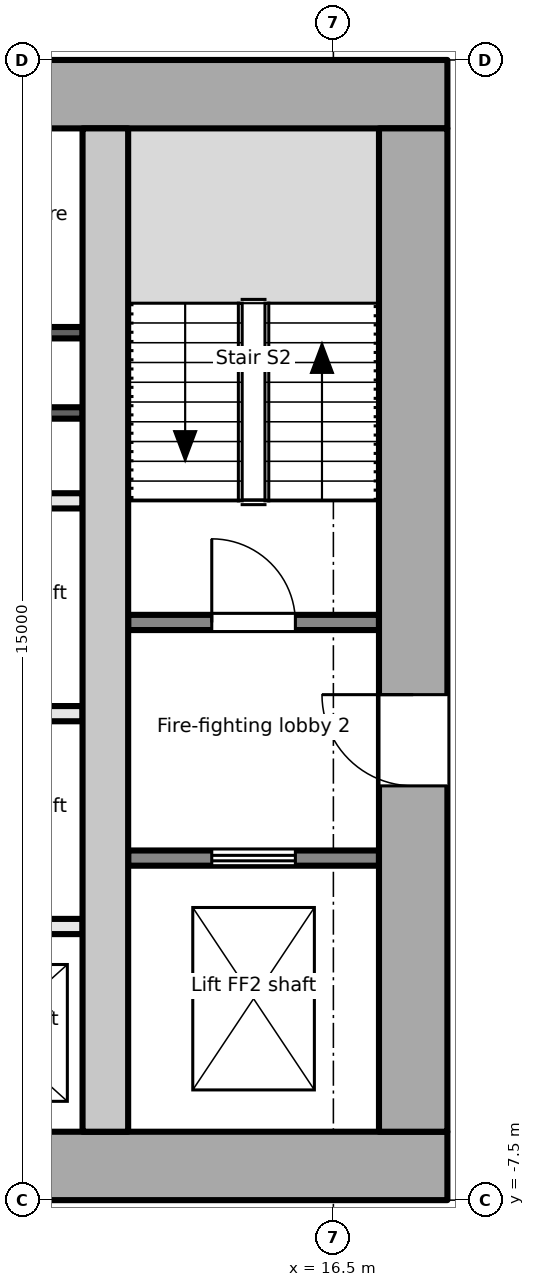
"""IFC4 building model, lengths in metres.
Left out: names, types, materials, properties, quantities, classifications, styles, units other than length and angle.
Written with IfcOpenShell. Run it as: python <this file> out.ifc"""

import sys

from ifc_helpers import new_model, si_unit, direction, frame, frame_2d, origin, place, context, subcontext, project, spatial, rectangle, extrude, element, fill, save


model = new_model("IFC4")
c1 = context("Model", 3, precision=1e-05, world=origin(), true_north=direction((0.0, 1.0)))
c2 = subcontext(c1, "Body", "Model", "MODEL_VIEW")
j1 = project(units=[si_unit("LENGTHUNIT", "METRE"), si_unit("PLANEANGLEUNIT", "RADIAN")], contexts=[c1])
p1 = place(None, origin())
s1 = spatial("IfcSite", under=j1, at=p1, CompositionType="ELEMENT")
p2 = place(p1, origin())
s2 = spatial("IfcBuilding", under=s1, at=p2, CompositionType="ELEMENT")
p3 = place(p2, frame((0.0, 0.0, 83.7)))
s3 = spatial("IfcBuildingStorey", under=s2, at=p3, CompositionType="ELEMENT", Elevation=83.7)
p4 = place(p3, frame((-18.0, -7.05, -0.2), z_axis=(0.0, 0.0, 1.0), x_axis=(1.0, 0.0, 0.0)))
e1 = element("IfcWall", 1, at=p4, inside=s3, PredefinedType="SHEAR", context=c2, shape_type="SweptSolid", body=[
    extrude(rectangle(XDim=36.0, YDim=0.9, at=frame_2d((18.0, 0.0))), origin(), (0.0, 0.0, 1.0), 4.0),
])
p5 = place(p4, frame((7.8, 0.0, 0.2)))
e2 = element("IfcOpeningElement", 2, at=p5, cuts=e1, PredefinedType="OPENING", context=c2, shape_type="SweptSolid", body=[
    extrude(rectangle(XDim=2.4, YDim=2.1, at=frame_2d((1.2, 1.05))), frame((0.0, 0.46, 0.0), z_axis=(0.0, -1.0, 0.0), x_axis=(1.0, 0.0, 0.0)), (0.0, 0.0, 1.0), 0.921),
])
p6 = place(p4, frame((17.4, 0.0, 0.2)))
e3 = element("IfcOpeningElement", 3, at=p6, cuts=e1, PredefinedType="OPENING", context=c2, shape_type="SweptSolid", body=[
    extrude(rectangle(XDim=1.2, YDim=2.1, at=frame_2d((0.6, 1.05))), frame((0.0, 0.46, 0.0), z_axis=(0.0, -1.0, 0.0), x_axis=(1.0, 0.0, 0.0)), (0.0, 0.0, 1.0), 0.921),
])
p7 = place(p4, frame((26.1, 0.0, 0.2)))
e4 = element("IfcOpeningElement", 4, at=p7, cuts=e1, PredefinedType="OPENING", context=c2, shape_type="SweptSolid", body=[
    extrude(rectangle(XDim=2.4, YDim=2.1, at=frame_2d((1.2, 1.05))), frame((0.0, 0.46, 0.0), z_axis=(0.0, -1.0, 0.0), x_axis=(1.0, 0.0, 0.0)), (0.0, 0.0, 1.0), 0.921),
])
p8 = place(p3, frame((-18.0, 7.05, -0.2), z_axis=(0.0, 0.0, 1.0), x_axis=(1.0, 0.0, 0.0)))
e5 = element("IfcWall", 5, at=p8, inside=s3, PredefinedType="SHEAR", context=c2, shape_type="SweptSolid", body=[
    extrude(rectangle(XDim=36.0, YDim=0.9, at=frame_2d((18.0, 0.0))), origin(), (0.0, 0.0, 1.0), 4.0),
])
p9 = place(p3, frame((17.55, -6.6, -0.2), z_axis=(0.0, 0.0, 1.0), x_axis=(0.0, 1.0, 0.0)))
e6 = element("IfcWall", 6, at=p9, inside=s3, PredefinedType="SHEAR", context=c2, shape_type="SweptSolid", body=[
    extrude(rectangle(XDim=13.2, YDim=0.9, at=frame_2d((6.6, 0.0))), origin(), (0.0, 0.0, 1.0), 4.0),
])
p10 = place(p9, frame((4.55, 0.0, 0.2)))
e7 = element("IfcOpeningElement", 7, at=p10, cuts=e6, PredefinedType="OPENING", context=c2, shape_type="SweptSolid", body=[
    extrude(rectangle(XDim=1.2, YDim=2.1, at=frame_2d((0.6, 1.05))), frame((0.0, 0.46, 0.0), z_axis=(0.0, -1.0, 0.0), x_axis=(1.0, 0.0, 0.0)), (0.0, 0.0, 1.0), 0.921),
])
p11 = place(p3, frame((13.5, -6.6, -0.2), z_axis=(0.0, 0.0, 1.0), x_axis=(0.0, 1.0, 0.0)))
e8 = element("IfcWall", 8, at=p11, inside=s3, PredefinedType="SHEAR", context=c2, shape_type="SweptSolid", body=[
    extrude(rectangle(XDim=13.2, YDim=0.6, at=frame_2d((6.6, 0.0))), origin(), (0.0, 0.0, 1.0), 4.0),
])
p12 = place(p3, frame((13.8, -3.0, 0.0), z_axis=(0.0, 0.0, 1.0), x_axis=(1.0, 0.0, 0.0)))
e9 = element("IfcWall", 9, at=p12, inside=s3, PredefinedType="PARTITIONING", context=c2, shape_type="SweptSolid", body=[
    extrude(rectangle(XDim=3.3, YDim=0.2, at=frame_2d((1.65, 0.0))), origin(), (0.0, 0.0, 1.0), 3.8),
])
p13 = place(p12, frame((1.1, 0.0, 0.0)))
e10 = element("IfcOpeningElement", 10, at=p13, cuts=e9, PredefinedType="OPENING", context=c2, shape_type="SweptSolid", body=[
    extrude(rectangle(XDim=1.1, YDim=2.1, at=frame_2d((0.55, 1.05))), frame((0.0, 0.111, 0.0), z_axis=(0.0, -1.0, 0.0), x_axis=(1.0, 0.0, 0.0)), (0.0, 0.0, 1.0), 0.221),
])
p14 = place(p3, frame((13.8, 0.1, 0.0), z_axis=(0.0, 0.0, 1.0), x_axis=(1.0, 0.0, 0.0)))
e11 = element("IfcWall", 11, at=p14, inside=s3, PredefinedType="PARTITIONING", context=c2, shape_type="SweptSolid", body=[
    extrude(rectangle(XDim=3.3, YDim=0.2, at=frame_2d((1.65, 0.0))), origin(), (0.0, 0.0, 1.0), 3.8),
])
p15 = place(p14, frame((1.1, 0.0, 0.0)))
e12 = element("IfcOpeningElement", 12, at=p15, cuts=e11, PredefinedType="OPENING", context=c2, shape_type="SweptSolid", body=[
    extrude(rectangle(XDim=1.1, YDim=2.1, at=frame_2d((0.55, 1.05))), frame((0.0, 0.111, 0.0), z_axis=(0.0, -1.0, 0.0), x_axis=(1.0, 0.0, 0.0)), (0.0, 0.0, 1.0), 0.221),
])
for number, where, z_axis, x_axis in (
    (13, (10.9, -3.9, 0.0), (0.0, 0.0, 1.0), (1.0, 0.0, 0.0)),
    (14, (10.9, -1.1, 0.0), (0.0, 0.0, 1.0), (1.0, 0.0, 0.0)),
    (15, (10.9, 1.7, 0.0), (0.0, 0.0, 1.0), (1.0, 0.0, 0.0)),
):
    element("IfcWall", number, at=place(p3, frame(where, z_axis=z_axis, x_axis=x_axis)), inside=s3, PredefinedType="PARTITIONING", context=c2, shape_type="SweptSolid", body=[
        extrude(rectangle(XDim=2.3, YDim=0.2, at=frame_2d((1.15, 0.0))), origin(), (0.0, 0.0, 1.0), 3.8),
    ])
for number, where, z_axis, x_axis in (
    (16, (10.9, 2.856, 0.0), (0.0, 0.0, 1.0), (1.0, 0.0, 0.0)),
    (17, (10.9, 3.912, 0.0), (0.0, 0.0, 1.0), (1.0, 0.0, 0.0)),
):
    element("IfcWall", number, at=place(p3, frame(where, z_axis=z_axis, x_axis=x_axis)), inside=s3, PredefinedType="PARTITIONING", context=c2, shape_type="SweptSolid", body=[
        extrude(rectangle(XDim=2.3, YDim=0.15, at=frame_2d((1.15, 0.0))), origin(), (0.0, 0.0, 1.0), 3.8),
    ])
p16 = place(p13, origin())
e18 = element("IfcDoor", 18, at=p16, inside=s3, OperationType="DOUBLE_DOOR_SLIDING", PredefinedType="DOOR", context=c2, shape_type="SweptSolid", body=[
    extrude(rectangle(XDim=1.1, YDim=2.1, at=frame_2d((0.55, 1.05))), frame((0.0, 0.025, 0.0), z_axis=(0.0, -1.0, 0.0), x_axis=(1.0, 0.0, 0.0)), (0.0, 0.0, 1.0), 0.05),
])
fill(e10, e18)
p17 = place(p10, origin())
e19 = element("IfcDoor", 19, at=p17, inside=s3, OperationType="SINGLE_SWING_RIGHT", PredefinedType="DOOR", context=c2, shape_type="SweptSolid", body=[
    extrude(rectangle(XDim=1.2, YDim=2.1, at=frame_2d((0.6, 1.05))), frame((0.0, 0.025, 0.0), z_axis=(0.0, -1.0, 0.0), x_axis=(1.0, 0.0, 0.0)), (0.0, 0.0, 1.0), 0.05),
])
fill(e7, e19)
p18 = place(p15, origin())
e20 = element("IfcDoor", 20, at=p18, inside=s3, OperationType="SINGLE_SWING_LEFT", PredefinedType="DOOR", context=c2, shape_type="SweptSolid", body=[
    extrude(rectangle(XDim=1.1, YDim=2.1, at=frame_2d((0.55, 1.05))), frame((0.0, 0.025, 0.0), z_axis=(0.0, -1.0, 0.0), x_axis=(1.0, 0.0, 0.0)), (0.0, 0.0, 1.0), 0.05),
])
fill(e12, e20)
save(model, sys.argv[1])
